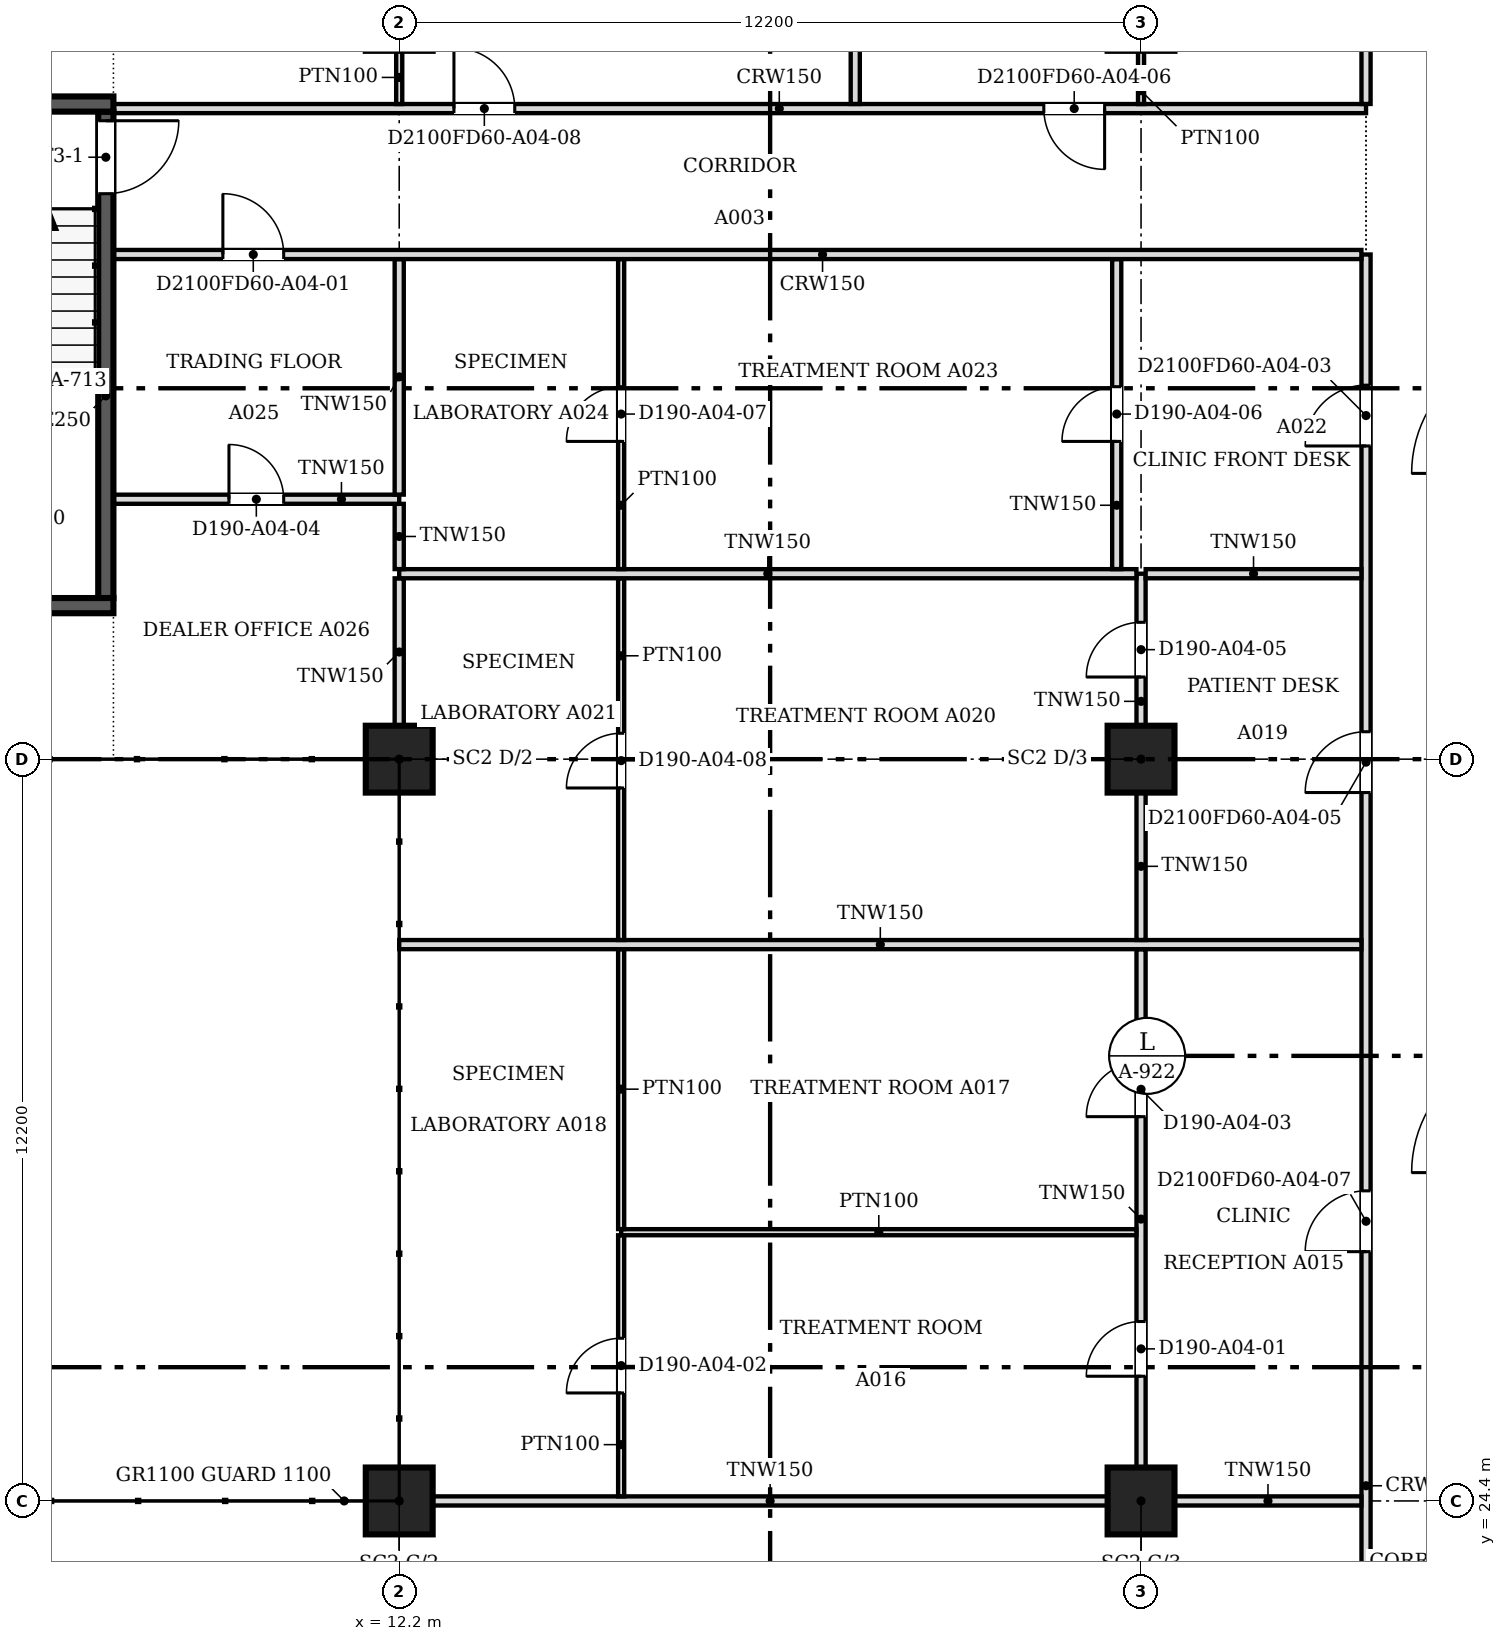
"""IFC4 building model, lengths in metres.
Left out: names, types, materials, properties, quantities, classifications, styles, units other than length and angle.
Written with IfcOpenShell. Run it as: python <this file> out.ifc"""

import sys

from ifc_helpers import new_model, si_unit, direction, frame, frame_2d, origin, origin_2d, place, context, subcontext, project, spatial, rectangle, extrude, source, transform, mapped, element, fill, save


model = new_model("IFC4")
c1 = context("Model", 3, precision=1e-05, world=origin(), true_north=direction((0.0, 1.0)))
c2 = subcontext(c1, "Body", "Model", "MODEL_VIEW")
j1 = project(units=[si_unit("LENGTHUNIT", "METRE"), si_unit("PLANEANGLEUNIT", "RADIAN")], contexts=[c1])
p1 = place(None, origin())
s1 = spatial("IfcSite", under=j1, at=p1, CompositionType="ELEMENT")
p2 = place(p1, origin())
s2 = spatial("IfcBuilding", under=s1, at=p2, CompositionType="ELEMENT")
p3 = place(p2, frame((0.0, 0.0, 52.4)))
s3 = spatial("IfcBuildingStorey", under=s2, at=p3, CompositionType="ELEMENT", Elevation=52.4)
for number, where, z_axis, x_axis in (
    (1, (12.2, 24.4, 0.0), (0.0, 0.0, 1.0), (1.0, 0.0, 0.0)),
    (2, (12.2, 36.6, 0.0), (0.0, 0.0, 1.0), (1.0, 0.0, 0.0)),
    (3, (24.4, 24.4, 0.0), (0.0, 0.0, 1.0), (1.0, 0.0, 0.0)),
    (4, (24.4, 36.6, 0.0), (0.0, 0.0, 1.0), (1.0, 0.0, 0.0)),
):
    element("IfcColumn", number, at=place(p3, frame(where, z_axis=z_axis, x_axis=x_axis)), inside=s3, PredefinedType="COLUMN", context=c2, shape_type="SweptSolid", body=[
        extrude(rectangle(XDim=1.1, YDim=1.1, at=origin_2d()), origin(), (0.0, 0.0, 1.0), 3.6),
    ])
for number, where, z_axis, x_axis in (
    (5, (7.5, 39.125, 0.0), (0.0, 0.0, 1.0), (-1.0, 0.0, 0.0)),
    (6, (3.6, 47.375, 0.0), (0.0, 0.0, 1.0), (1.0, 0.0, 0.0)),
):
    element("IfcWall", number, at=place(p3, frame(where, z_axis=z_axis, x_axis=x_axis)), inside=s3, PredefinedType="SOLIDWALL", context=c2, shape_type="SweptSolid", body=[
        extrude(rectangle(XDim=3.9, YDim=0.25, at=frame_2d((1.95, 0.0))), origin(), (0.0, 0.0, 1.0), 3.8),
    ])
p4 = place(p3, frame((7.375, 47.25, 0.0), z_axis=(0.0, 0.0, 1.0), x_axis=(0.0, -1.0, 0.0)))
e7 = element("IfcWall", 7, at=p4, inside=s3, PredefinedType="SOLIDWALL", context=c2, shape_type="SweptSolid", body=[
    extrude(rectangle(XDim=8.0, YDim=0.25, at=frame_2d((4.0, 0.0))), origin(), (0.0, 0.0, 1.0), 3.8),
])
m1 = source(origin(), c2, "Body", "SweptSolid", [
    extrude(rectangle(XDim=1.2, YDim=2.1, at=frame_2d((0.6, 1.05))), frame((0.0, 0.135, 0.0), z_axis=(0.0, -1.0, 0.0), x_axis=(1.0, 0.0, 0.0)), (0.0, 0.0, 1.0), 0.27),
])
p5 = place(p4, frame((0.15, 0.0, 0.0)))
e8 = element("IfcOpeningElement", 8, at=p5, cuts=e7, PredefinedType="OPENING", context=c2, shape_type="MappedRepresentation", body=[
    mapped(m1, transform((0.0, 0.0, 0.0), scale=1.0)),
])
p6 = place(p3, frame((28.1, 18.8, 0.0), z_axis=(0.0, 0.0, 1.0), x_axis=(0.0, 1.0, 0.0)))
e9 = element("IfcWall", 9, at=p6, inside=s3, PredefinedType="PARTITIONING", context=c2, shape_type="SweptSolid", body=[
    extrude(rectangle(XDim=26.1, YDim=0.15, at=frame_2d((13.05, 0.0))), origin(), (0.0, 0.0, 1.0), 3.067),
])
m2 = source(origin(), c2, "Body", "SweptSolid", [
    extrude(rectangle(XDim=0.9, YDim=2.1, at=frame_2d((0.45, 1.05))), frame((0.0, 0.085, 0.0), z_axis=(0.0, -1.0, 0.0), x_axis=(1.0, 0.0, 0.0)), (0.0, 0.0, 1.0), 0.17),
])
p7 = place(p6, frame((1.1, 0.0, 0.0)))
e10 = element("IfcOpeningElement", 10, at=p7, cuts=e9, PredefinedType="OPENING", context=c2, shape_type="MappedRepresentation", body=[
    mapped(m2, transform((0.0, 0.0, 0.0), scale=1.0)),
])
m3 = source(origin(), c2, "Body", "SweptSolid", [
    extrude(rectangle(XDim=1.0, YDim=2.1, at=frame_2d((0.5, 1.05))), frame((0.0, 0.085, 0.0), z_axis=(0.0, -1.0, 0.0), x_axis=(1.0, 0.0, 0.0)), (0.0, 0.0, 1.0), 0.17),
])
p8 = place(p6, frame((22.951, 0.0, 0.0)))
e11 = element("IfcOpeningElement", 11, at=p8, cuts=e9, PredefinedType="OPENING", context=c2, shape_type="MappedRepresentation", body=[
    mapped(m3, transform((0.0, 0.0, 0.0), scale=1.0)),
])
p9 = place(p6, frame((17.251, 0.0, 0.0)))
e12 = element("IfcOpeningElement", 12, at=p9, cuts=e9, PredefinedType="OPENING", context=c2, shape_type="MappedRepresentation", body=[
    mapped(m3, transform((0.0, 0.0, 0.0), scale=1.0)),
])
p10 = place(p6, frame((9.7, 0.0, 0.0)))
e13 = element("IfcOpeningElement", 13, at=p10, cuts=e9, PredefinedType="OPENING", context=c2, shape_type="MappedRepresentation", body=[
    mapped(m3, transform((0.0, 0.0, 0.0), scale=1.0)),
])
p11 = place(p3, frame((12.751, 24.4, 0.0), z_axis=(0.0, 0.0, 1.0), x_axis=(1.0, 0.0, 0.0)))
e14 = element("IfcWall", 14, at=p11, inside=s3, PredefinedType="PARTITIONING", context=c2, shape_type="SweptSolid", body=[
    extrude(rectangle(XDim=11.098, YDim=0.15, at=frame_2d((5.549, 0.0))), origin(), (0.0, 0.0, 1.0), 3.067),
])
p12 = place(p3, frame((24.951, 24.4, 0.0), z_axis=(0.0, 0.0, 1.0), x_axis=(1.0, 0.0, 0.0)))
e15 = element("IfcWall", 15, at=p12, inside=s3, PredefinedType="PARTITIONING", context=c2, shape_type="SweptSolid", body=[
    extrude(rectangle(XDim=3.073, YDim=0.15, at=frame_2d((1.537, 0.0))), origin(), (0.0, 0.0, 1.0), 3.067),
])
p13 = place(p3, frame((15.85, 24.476, 0.0), z_axis=(0.0, 0.0, 1.0), x_axis=(0.0, 1.0, 0.0)))
e16 = element("IfcWall", 16, at=p13, inside=s3, PredefinedType="PARTITIONING", context=c2, shape_type="SweptSolid", body=[
    extrude(rectangle(XDim=4.293, YDim=0.1, at=frame_2d((2.146, 0.0))), origin(), (0.0, 0.0, 1.0), 3.067),
])
m4 = source(origin(), c2, "Body", "SweptSolid", [
    extrude(rectangle(XDim=0.9, YDim=2.1, at=frame_2d((0.45, 1.05))), frame((0.0, 0.06, 0.0), z_axis=(0.0, -1.0, 0.0), x_axis=(1.0, 0.0, 0.0)), (0.0, 0.0, 1.0), 0.12),
])
p14 = place(p13, frame((1.7, 0.0, 0.0)))
e17 = element("IfcOpeningElement", 17, at=p14, cuts=e16, PredefinedType="OPENING", context=c2, shape_type="MappedRepresentation", body=[
    mapped(m4, transform((0.0, 0.0, 0.0), scale=1.0)),
])
p15 = place(p3, frame((24.4, 24.951, 0.0), z_axis=(0.0, 0.0, 1.0), x_axis=(0.0, 1.0, 0.0)))
e18 = element("IfcWall", 18, at=p15, inside=s3, PredefinedType="PARTITIONING", context=c2, shape_type="SweptSolid", body=[
    extrude(rectangle(XDim=8.523, YDim=0.15, at=frame_2d((4.262, 0.0))), origin(), (0.0, 0.0, 1.0), 3.067),
])
p16 = place(p15, frame((1.5, 0.0, 0.0)))
e19 = element("IfcOpeningElement", 19, at=p16, cuts=e18, PredefinedType="OPENING", context=c2, shape_type="MappedRepresentation", body=[
    mapped(m2, transform((0.0, 0.0, 0.0), scale=1.0)),
])
p17 = place(p15, frame((5.769, 0.0, 0.0)))
e20 = element("IfcOpeningElement", 20, at=p17, cuts=e18, PredefinedType="OPENING", context=c2, shape_type="MappedRepresentation", body=[
    mapped(m2, transform((0.0, 0.0, 0.0), scale=1.0)),
])
p18 = place(p3, frame((15.85, 28.82, 0.0), z_axis=(0.0, 0.0, 1.0), x_axis=(1.0, 0.0, 0.0)))
e21 = element("IfcWall", 21, at=p18, inside=s3, PredefinedType="PARTITIONING", context=c2, shape_type="SweptSolid", body=[
    extrude(rectangle(XDim=8.474, YDim=0.1, at=frame_2d((4.237, 0.0))), origin(), (0.0, 0.0, 1.0), 3.067),
])
p19 = place(p3, frame((15.85, 28.871, 0.0), z_axis=(0.0, 0.0, 1.0), x_axis=(0.0, 1.0, 0.0)))
e22 = element("IfcWall", 22, at=p19, inside=s3, PredefinedType="PARTITIONING", context=c2, shape_type="SweptSolid", body=[
    extrude(rectangle(XDim=4.603, YDim=0.1, at=frame_2d((2.301, 0.0))), origin(), (0.0, 0.0, 1.0), 3.067),
])
p20 = place(p3, frame((12.2, 33.55, 0.0), z_axis=(0.0, 0.0, 1.0), x_axis=(1.0, 0.0, 0.0)))
e23 = element("IfcWall", 23, at=p20, inside=s3, PredefinedType="PARTITIONING", context=c2, shape_type="SweptSolid", body=[
    extrude(rectangle(XDim=15.824, YDim=0.15, at=frame_2d((7.912, 0.0))), origin(), (0.0, 0.0, 1.0), 3.067),
])
p21 = place(p3, frame((15.85, 33.626, 0.0), z_axis=(0.0, 0.0, 1.0), x_axis=(0.0, 1.0, 0.0)))
e24 = element("IfcWall", 24, at=p21, inside=s3, PredefinedType="PARTITIONING", context=c2, shape_type="SweptSolid", body=[
    extrude(rectangle(XDim=5.948, YDim=0.1, at=frame_2d((2.974, 0.0))), origin(), (0.0, 0.0, 1.0), 3.067),
])
p22 = place(p21, frame((2.5, 0.0, 0.0)))
e25 = element("IfcOpeningElement", 25, at=p22, cuts=e24, PredefinedType="OPENING", context=c2, shape_type="MappedRepresentation", body=[
    mapped(m4, transform((0.0, 0.0, 0.0), scale=1.0)),
])
for number, where, z_axis, x_axis in (
    (26, (24.4, 33.626, 0.0), (0.0, 0.0, 1.0), (0.0, 1.0, 0.0)),
    (27, (12.2, 37.151, 0.0), (0.0, 0.0, 1.0), (0.0, 1.0, 0.0)),
):
    element("IfcWall", number, at=place(p3, frame(where, z_axis=z_axis, x_axis=x_axis)), inside=s3, PredefinedType="PARTITIONING", context=c2, shape_type="SweptSolid", body=[
        extrude(rectangle(XDim=2.423, YDim=0.15, at=frame_2d((1.211, 0.0))), origin(), (0.0, 0.0, 1.0), 3.067),
    ])
p23 = place(p3, frame((24.4, 37.151, 0.0), z_axis=(0.0, 0.0, 1.0), x_axis=(0.0, 1.0, 0.0)))
e28 = element("IfcWall", 28, at=p23, inside=s3, PredefinedType="PARTITIONING", context=c2, shape_type="SweptSolid", body=[
    extrude(rectangle(XDim=2.499, YDim=0.15, at=frame_2d((1.25, 0.0))), origin(), (0.0, 0.0, 1.0), 3.067),
])
p24 = place(p23, frame((0.8, 0.0, 0.0)))
e29 = element("IfcOpeningElement", 29, at=p24, cuts=e28, PredefinedType="OPENING", context=c2, shape_type="MappedRepresentation", body=[
    mapped(m2, transform((0.0, 0.0, 0.0), scale=1.0)),
])
p25 = place(p3, frame((12.2, 39.65, 0.0), z_axis=(0.0, 0.0, 1.0), x_axis=(1.0, 0.0, 0.0)))
e30 = element("IfcWall", 30, at=p25, inside=s3, PredefinedType="PARTITIONING", context=c2, shape_type="SweptSolid", body=[
    extrude(rectangle(XDim=12.124, YDim=0.15, at=frame_2d((6.062, 0.0))), origin(), (0.0, 0.0, 1.0), 3.067),
])
p26 = place(p3, frame((24.476, 39.65, 0.0), z_axis=(0.0, 0.0, 1.0), x_axis=(1.0, 0.0, 0.0)))
e31 = element("IfcWall", 31, at=p26, inside=s3, PredefinedType="PARTITIONING", context=c2, shape_type="SweptSolid", body=[
    extrude(rectangle(XDim=3.548, YDim=0.15, at=frame_2d((1.774, 0.0))), origin(), (0.0, 0.0, 1.0), 3.067),
])
p27 = place(p3, frame((12.2, 39.726, 0.0), z_axis=(0.0, 0.0, 1.0), x_axis=(0.0, 1.0, 0.0)))
e32 = element("IfcWall", 32, at=p27, inside=s3, PredefinedType="PARTITIONING", context=c2, shape_type="SweptSolid", body=[
    extrude(rectangle(XDim=1.073, YDim=0.15, at=frame_2d((0.537, 0.0))), origin(), (0.0, 0.0, 1.0), 3.067),
])
p28 = place(p3, frame((15.85, 39.726, 0.0), z_axis=(0.0, 0.0, 1.0), x_axis=(0.0, 1.0, 0.0)))
e33 = element("IfcWall", 33, at=p28, inside=s3, PredefinedType="PARTITIONING", context=c2, shape_type="SweptSolid", body=[
    extrude(rectangle(XDim=5.098, YDim=0.1, at=frame_2d((2.549, 0.0))), origin(), (0.0, 0.0, 1.0), 3.067),
])
p29 = place(p28, frame((2.1, 0.0, 0.0)))
e34 = element("IfcOpeningElement", 34, at=p29, cuts=e33, PredefinedType="OPENING", context=c2, shape_type="MappedRepresentation", body=[
    mapped(m4, transform((0.0, 0.0, 0.0), scale=1.0)),
])
p30 = place(p3, frame((24.0, 39.726, 0.0), z_axis=(0.0, 0.0, 1.0), x_axis=(0.0, 1.0, 0.0)))
e35 = element("IfcWall", 35, at=p30, inside=s3, PredefinedType="PARTITIONING", context=c2, shape_type="SweptSolid", body=[
    extrude(rectangle(XDim=5.098, YDim=0.15, at=frame_2d((2.549, 0.0))), origin(), (0.0, 0.0, 1.0), 3.067),
])
p31 = place(p30, frame((2.1, 0.0, 0.0)))
e36 = element("IfcOpeningElement", 36, at=p31, cuts=e35, PredefinedType="OPENING", context=c2, shape_type="MappedRepresentation", body=[
    mapped(m2, transform((0.0, 0.0, 0.0), scale=1.0)),
])
p32 = place(p3, frame((12.2, 40.875, 0.0), z_axis=(0.0, 0.0, 1.0), x_axis=(-1.0, 0.0, 0.0)))
e37 = element("IfcWall", 37, at=p32, inside=s3, PredefinedType="PARTITIONING", context=c2, shape_type="SweptSolid", body=[
    extrude(rectangle(XDim=4.7, YDim=0.15, at=frame_2d((2.35, 0.0))), origin(), (0.0, 0.0, 1.0), 3.067),
])
p33 = place(p32, frame((1.9, 0.0, 0.0)))
e38 = element("IfcOpeningElement", 38, at=p33, cuts=e37, PredefinedType="OPENING", context=c2, shape_type="MappedRepresentation", body=[
    mapped(m2, transform((0.0, 0.0, 0.0), scale=1.0)),
])
p34 = place(p3, frame((12.2, 40.951, 0.0), z_axis=(0.0, 0.0, 1.0), x_axis=(0.0, 1.0, 0.0)))
e39 = element("IfcWall", 39, at=p34, inside=s3, PredefinedType="PARTITIONING", context=c2, shape_type="SweptSolid", body=[
    extrude(rectangle(XDim=3.873, YDim=0.15, at=frame_2d((1.937, 0.0))), origin(), (0.0, 0.0, 1.0), 3.067),
])
p35 = place(p3, frame((28.024, 44.9, 0.0), z_axis=(0.0, 0.0, 1.0), x_axis=(-1.0, 0.0, 0.0)))
e40 = element("IfcWall", 40, at=p35, inside=s3, PredefinedType="PARTITIONING", context=c2, shape_type="SweptSolid", body=[
    extrude(rectangle(XDim=20.524, YDim=0.15, at=frame_2d((10.262, 0.0))), origin(), (0.0, 0.0, 1.0), 3.067),
])
p36 = place(p35, frame((17.724, 0.0, 0.0)))
e41 = element("IfcOpeningElement", 41, at=p36, cuts=e40, PredefinedType="OPENING", context=c2, shape_type="MappedRepresentation", body=[
    mapped(m3, transform((0.0, 0.0, 0.0), scale=1.0)),
])
p37 = place(p3, frame((7.5, 47.3, 0.0), z_axis=(0.0, 0.0, 1.0), x_axis=(1.0, 0.0, 0.0)))
e42 = element("IfcWall", 42, at=p37, inside=s3, PredefinedType="PARTITIONING", context=c2, shape_type="SweptSolid", body=[
    extrude(rectangle(XDim=20.6, YDim=0.15, at=frame_2d((10.3, 0.0))), origin(), (0.0, 0.0, 1.0), 3.067),
])
p38 = place(p37, frame((15.301, 0.0, 0.0)))
e43 = element("IfcOpeningElement", 43, at=p38, cuts=e42, PredefinedType="OPENING", context=c2, shape_type="MappedRepresentation", body=[
    mapped(m3, transform((0.0, 0.0, 0.0), scale=1.0)),
])
p39 = place(p37, frame((5.6, 0.0, 0.0)))
e44 = element("IfcOpeningElement", 44, at=p39, cuts=e42, PredefinedType="OPENING", context=c2, shape_type="MappedRepresentation", body=[
    mapped(m3, transform((0.0, 0.0, 0.0), scale=1.0)),
])
p40 = place(p3, frame((19.7, 47.376, 0.0), z_axis=(0.0, 0.0, 1.0), x_axis=(0.0, 1.0, 0.0)))
e45 = element("IfcWall", 45, at=p40, inside=s3, PredefinedType="PARTITIONING", context=c2, shape_type="SweptSolid", body=[
    extrude(rectangle(XDim=7.024, YDim=0.15, at=frame_2d((3.512, 0.0))), origin(), (0.0, 0.0, 1.0), 3.067),
])
p41 = place(p3, frame((28.1, 47.376, 0.0), z_axis=(0.0, 0.0, 1.0), x_axis=(0.0, 1.0, 0.0)))
e46 = element("IfcWall", 46, at=p41, inside=s3, PredefinedType="PARTITIONING", context=c2, shape_type="SweptSolid", body=[
    extrude(rectangle(XDim=3.748, YDim=0.15, at=frame_2d((1.874, 0.0))), origin(), (0.0, 0.0, 1.0), 3.067),
])
for number, where, z_axis, x_axis in (
    (47, (12.2, 48.25, 0.0), (0.0, 0.0, 1.0), (0.0, -1.0, 0.0)),
    (48, (24.4, 48.25, 0.0), (0.0, 0.0, 1.0), (0.0, -1.0, 0.0)),
):
    element("IfcWall", number, at=place(p3, frame(where, z_axis=z_axis, x_axis=x_axis)), inside=s3, PredefinedType="PARTITIONING", context=c2, shape_type="SweptSolid", body=[
        extrude(rectangle(XDim=0.875, YDim=0.1, at=frame_2d((0.438, 0.0))), origin(), (0.0, 0.0, 1.0), 3.067),
    ])
m5 = source(origin(), c2, "Body", "SweptSolid", [
    extrude(rectangle(XDim=1.2, YDim=2.1, at=frame_2d((0.6, 1.05))), frame((0.0, 0.025, 0.0), z_axis=(0.0, -1.0, 0.0), x_axis=(1.0, 0.0, 0.0)), (0.0, 0.0, 1.0), 0.05),
])
p42 = place(p5, origin())
e49 = element("IfcDoor", 49, at=p42, inside=s3, OperationType="SINGLE_SWING_LEFT", PredefinedType="DOOR", context=c2, shape_type="MappedRepresentation", body=[
    mapped(m5, transform((0.0, 0.0, 0.0), scale=1.0)),
])
fill(e8, e49)
m6 = source(origin(), c2, "Body", "SweptSolid", [
    extrude(rectangle(XDim=0.9, YDim=2.1, at=frame_2d((0.45, 1.05))), frame((0.0, 0.025, 0.0), z_axis=(0.0, -1.0, 0.0), x_axis=(1.0, 0.0, 0.0)), (0.0, 0.0, 1.0), 0.05),
])
p43 = place(p16, origin())
e50 = element("IfcDoor", 50, at=p43, inside=s3, OperationType="SINGLE_SWING_LEFT", PredefinedType="DOOR", context=c2, shape_type="MappedRepresentation", body=[
    mapped(m6, transform((0.0, 0.0, 0.0), scale=1.0)),
])
fill(e19, e50)
p44 = place(p14, origin())
e51 = element("IfcDoor", 51, at=p44, inside=s3, OperationType="SINGLE_SWING_LEFT", PredefinedType="DOOR", context=c2, shape_type="MappedRepresentation", body=[
    mapped(m6, transform((0.0, 0.0, 0.0), scale=1.0)),
])
fill(e17, e51)
p45 = place(p17, origin())
e52 = element("IfcDoor", 52, at=p45, inside=s3, OperationType="SINGLE_SWING_LEFT", PredefinedType="DOOR", context=c2, shape_type="MappedRepresentation", body=[
    mapped(m6, transform((0.0, 0.0, 0.0), scale=1.0)),
])
fill(e20, e52)
m7 = source(origin(), c2, "Body", "SweptSolid", [
    extrude(rectangle(XDim=1.0, YDim=2.1, at=frame_2d((0.5, 1.05))), frame((0.0, 0.025, 0.0), z_axis=(0.0, -1.0, 0.0), x_axis=(1.0, 0.0, 0.0)), (0.0, 0.0, 1.0), 0.05),
])
p46 = place(p36, origin())
e53 = element("IfcDoor", 53, at=p46, inside=s3, OperationType="SINGLE_SWING_RIGHT", PredefinedType="DOOR", context=c2, shape_type="MappedRepresentation", body=[
    mapped(m7, transform((0.0, 0.0, 0.0), scale=1.0)),
])
fill(e41, e53)
p47 = place(p33, origin())
e54 = element("IfcDoor", 54, at=p47, inside=s3, OperationType="SINGLE_SWING_RIGHT", PredefinedType="DOOR", context=c2, shape_type="MappedRepresentation", body=[
    mapped(m6, transform((0.0, 0.0, 0.0), scale=1.0)),
])
fill(e38, e54)
p48 = place(p24, origin())
e55 = element("IfcDoor", 55, at=p48, inside=s3, OperationType="SINGLE_SWING_LEFT", PredefinedType="DOOR", context=c2, shape_type="MappedRepresentation", body=[
    mapped(m6, transform((0.0, 0.0, 0.0), scale=1.0)),
])
fill(e29, e55)
p49 = place(p31, origin())
e56 = element("IfcDoor", 56, at=p49, inside=s3, OperationType="SINGLE_SWING_LEFT", PredefinedType="DOOR", context=c2, shape_type="MappedRepresentation", body=[
    mapped(m6, transform((0.0, 0.0, 0.0), scale=1.0)),
])
fill(e36, e56)
p50 = place(p29, origin())
e57 = element("IfcDoor", 57, at=p50, inside=s3, OperationType="SINGLE_SWING_LEFT", PredefinedType="DOOR", context=c2, shape_type="MappedRepresentation", body=[
    mapped(m6, transform((0.0, 0.0, 0.0), scale=1.0)),
])
fill(e34, e57)
p51 = place(p8, origin())
e58 = element("IfcDoor", 58, at=p51, inside=s3, OperationType="SINGLE_SWING_LEFT", PredefinedType="DOOR", context=c2, shape_type="MappedRepresentation", body=[
    mapped(m7, transform((0.0, 0.0, 0.0), scale=1.0)),
])
fill(e11, e58)
p52 = place(p22, origin())
e59 = element("IfcDoor", 59, at=p52, inside=s3, OperationType="SINGLE_SWING_LEFT", PredefinedType="DOOR", context=c2, shape_type="MappedRepresentation", body=[
    mapped(m6, transform((0.0, 0.0, 0.0), scale=1.0)),
])
fill(e25, e59)
p53 = place(p9, origin())
e60 = element("IfcDoor", 60, at=p53, inside=s3, OperationType="SINGLE_SWING_LEFT", PredefinedType="DOOR", context=c2, shape_type="MappedRepresentation", body=[
    mapped(m7, transform((0.0, 0.0, 0.0), scale=1.0)),
])
fill(e12, e60)
p54 = place(p38, origin())
e61 = element("IfcDoor", 61, at=p54, inside=s3, OperationType="SINGLE_SWING_RIGHT", PredefinedType="DOOR", context=c2, shape_type="MappedRepresentation", body=[
    mapped(m7, transform((0.0, 0.0, 0.0), scale=1.0)),
])
fill(e43, e61)
p55 = place(p10, origin())
e62 = element("IfcDoor", 62, at=p55, inside=s3, OperationType="SINGLE_SWING_LEFT", PredefinedType="DOOR", context=c2, shape_type="MappedRepresentation", body=[
    mapped(m7, transform((0.0, 0.0, 0.0), scale=1.0)),
])
fill(e13, e62)
p56 = place(p39, origin())
e63 = element("IfcDoor", 63, at=p56, inside=s3, OperationType="SINGLE_SWING_LEFT", PredefinedType="DOOR", context=c2, shape_type="MappedRepresentation", body=[
    mapped(m7, transform((0.0, 0.0, 0.0), scale=1.0)),
])
fill(e44, e63)
save(model, sys.argv[1])
